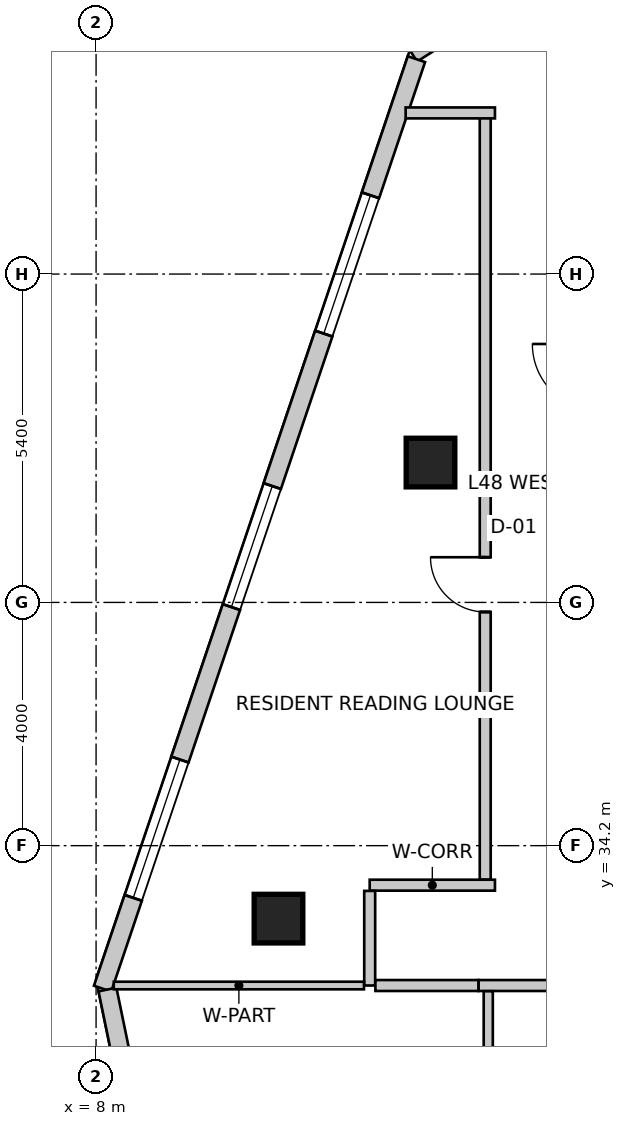
"""IFC4 building model, lengths in metres.
Left out: names, types, materials, properties, quantities, classifications, styles, units other than length and angle.
Written with IfcOpenShell. Run it as: python <this file> out.ifc"""

import sys

from ifc_helpers import new_model, si_unit, direction, frame, frame_2d, origin, origin_2d, place, context, subcontext, project, spatial, rectangle, extrude, source, transform, mapped, element, fill, save


model = new_model("IFC4")
c1 = context("Model", 3, precision=1e-05, world=origin(), true_north=direction((0.0, 1.0)))
c2 = subcontext(c1, "Body", "Model", "MODEL_VIEW")
j1 = project(units=[si_unit("LENGTHUNIT", "METRE"), si_unit("PLANEANGLEUNIT", "RADIAN")], contexts=[c1])
p1 = place(None, origin())
s1 = spatial("IfcSite", under=j1, at=p1, CompositionType="ELEMENT")
p2 = place(p1, origin())
s2 = spatial("IfcBuilding", under=s1, at=p2, CompositionType="ELEMENT")
p3 = place(p2, frame((0.0, 0.0, 193.9)))
s3 = spatial("IfcBuildingStorey", under=s2, at=p3, CompositionType="ELEMENT", Elevation=193.9)
m1 = source(origin(), c2, "Body", "SweptSolid", [
    extrude(rectangle(XDim=0.8, YDim=0.8, at=origin_2d()), origin(), (0.0, 0.0, 1.0), 3.5),
])
for number, where, z_axis, x_axis in (
    (1, (11.0, 33.0, 0.0), (0.0, 0.0, 1.0), (1.0, 0.0, 0.0)),
    (2, (13.5, 40.5, 0.0), (0.0, 0.0, 1.0), (1.0, 0.0, 0.0)),
):
    element("IfcColumn", number, at=place(p3, frame(where, z_axis=z_axis, x_axis=x_axis)), inside=s3, PredefinedType="COLUMN", context=c2, shape_type="MappedRepresentation", body=[
        mapped(m1, transform((0.0, 0.0, 0.0), scale=1.0)),
    ])
p4 = place(p3, frame((21.875, 52.742, 0.0), z_axis=(0.0, 0.0, 1.0), x_axis=(-0.843666375448, -0.536867811419, 0.0)))
e3 = element("IfcWall", 3, at=p4, inside=s3, PredefinedType="SOLIDWALL", context=c2, shape_type="SweptSolid", body=[
    extrude(rectangle(XDim=10.284, YDim=0.3, at=frame_2d((5.142, 0.0))), origin(), (0.0, 0.0, 1.0), 3.25),
])
m2 = source(origin(), c2, "Body", "SweptSolid", [
    extrude(rectangle(XDim=2.1, YDim=2.0, at=frame_2d((1.05, 1.0))), frame((0.0, 0.16, 0.0), z_axis=(0.0, -1.0, 0.0), x_axis=(1.0, 0.0, 0.0)), (0.0, 0.0, 1.0), 0.32),
])
p5 = place(p4, frame((3.457, 0.0, 0.85)))
e4 = element("IfcOpeningElement", 4, at=p5, cuts=e3, PredefinedType="OPENING", context=c2, shape_type="MappedRepresentation", body=[
    mapped(m2, transform((0.0, 0.0, 0.0), scale=1.0)),
])
p6 = place(p3, frame((13.269, 47.134, 0.0), z_axis=(0.0, 0.0, 1.0), x_axis=(-0.319920776449, -0.947444297464, 0.0)))
e5 = element("IfcWall", 5, at=p6, inside=s3, PredefinedType="SOLIDWALL", context=c2, shape_type="SweptSolid", body=[
    extrude(rectangle(XDim=16.133, YDim=0.3, at=frame_2d((8.067, 0.0))), origin(), (0.0, 0.0, 1.0), 3.25),
])
m3 = source(origin(), c2, "Body", "SweptSolid", [
    extrude(rectangle(XDim=2.4, YDim=2.2, at=frame_2d((1.2, 1.1))), frame((0.0, 0.16, 0.0), z_axis=(0.0, -1.0, 0.0), x_axis=(1.0, 0.0, 0.0)), (0.0, 0.0, 1.0), 0.32),
])
p7 = place(p6, frame((2.363, 0.0, 0.85)))
e6 = element("IfcOpeningElement", 6, at=p7, cuts=e5, PredefinedType="OPENING", context=c2, shape_type="MappedRepresentation", body=[
    mapped(m3, transform((0.0, 0.0, 0.0), scale=1.0)),
])
p8 = place(p6, frame((7.41, 0.0, 0.85)))
e7 = element("IfcOpeningElement", 7, at=p8, cuts=e5, PredefinedType="OPENING", context=c2, shape_type="MappedRepresentation", body=[
    mapped(m2, transform((0.0, 0.0, 0.0), scale=1.0)),
])
p9 = place(p6, frame((12.157, 0.0, 0.85)))
e8 = element("IfcOpeningElement", 8, at=p9, cuts=e5, PredefinedType="OPENING", context=c2, shape_type="MappedRepresentation", body=[
    mapped(m3, transform((0.0, 0.0, 0.0), scale=1.0)),
])
p10 = place(p3, frame((8.188, 31.834, 0.0), z_axis=(0.0, 0.0, 1.0), x_axis=(0.202303475707, -0.979322880217, 0.0)))
e9 = element("IfcWall", 9, at=p10, inside=s3, PredefinedType="SOLIDWALL", context=c2, shape_type="SweptSolid", body=[
    extrude(rectangle(XDim=15.766, YDim=0.3, at=frame_2d((7.883, 0.0))), origin(), (0.0, 0.0, 1.0), 3.25),
])
p11 = place(p10, frame((2.399, 0.0, 0.85)))
e10 = element("IfcOpeningElement", 10, at=p11, cuts=e9, PredefinedType="OPENING", context=c2, shape_type="MappedRepresentation", body=[
    mapped(m2, transform((0.0, 0.0, 0.0), scale=1.0)),
])
p12 = place(p10, frame((8.798, 0.0, 0.85)))
e11 = element("IfcOpeningElement", 11, at=p12, cuts=e9, PredefinedType="OPENING", context=c2, shape_type="MappedRepresentation", body=[
    mapped(m2, transform((0.0, 0.0, 0.0), scale=1.0)),
])
m4 = source(origin(), c2, "Body", "SweptSolid", [
    extrude(rectangle(XDim=1.2, YDim=1.6, at=frame_2d((0.6, 0.8))), frame((0.0, 0.16, 0.0), z_axis=(0.0, -1.0, 0.0), x_axis=(1.0, 0.0, 0.0)), (0.0, 0.0, 1.0), 0.32),
])
p13 = place(p10, frame((14.052, 0.0, 0.85)))
e12 = element("IfcOpeningElement", 12, at=p13, cuts=e9, PredefinedType="OPENING", context=c2, shape_type="MappedRepresentation", body=[
    mapped(m4, transform((0.0, 0.0, 0.0), scale=1.0)),
])
p14 = place(p3, frame((12.5, 33.55, 0.0), z_axis=(0.0, 0.0, 1.0), x_axis=(1.0, 0.0, 0.0)))
e13 = element("IfcWall", 13, at=p14, inside=s3, PredefinedType="PARTITIONING", context=c2, shape_type="SweptSolid", body=[
    extrude(rectangle(XDim=2.06, YDim=0.18, at=frame_2d((1.03, 0.0))), origin(), (0.0, 0.0, 1.0), 3.25),
])
p15 = place(p3, frame((12.5, 31.9, 0.0), z_axis=(0.0, 0.0, 1.0), x_axis=(0.0, 1.0, 0.0)))
e14 = element("IfcWall", 14, at=p15, inside=s3, PredefinedType="PARTITIONING", context=c2, shape_type="SweptSolid", body=[
    extrude(rectangle(XDim=1.556, YDim=0.18, at=frame_2d((0.778, 0.0))), origin(), (0.0, 0.0, 1.0), 2.835),
])
p16 = place(p3, frame((17.36, 31.9, 0.0), z_axis=(0.0, 0.0, 1.0), x_axis=(-1.0, 0.0, 0.0)))
e15 = element("IfcWall", 15, at=p16, inside=s3, PredefinedType="PARTITIONING", context=c2, shape_type="SweptSolid", body=[
    extrude(rectangle(XDim=3.07, YDim=0.18, at=frame_2d((1.535, 0.0))), origin(), (0.0, 0.0, 1.0), 2.835),
])
p17 = place(p3, frame((14.288, 31.9, 0.0), z_axis=(0.0, 0.0, 1.0), x_axis=(-1.0, 0.0, 0.0)))
e16 = element("IfcWall", 16, at=p17, inside=s3, PredefinedType="PARTITIONING", context=c2, shape_type="SweptSolid", body=[
    extrude(rectangle(XDim=1.694, YDim=0.18, at=frame_2d((0.847, 0.0))), origin(), (0.0, 0.0, 1.0), 2.835),
])
p18 = place(p3, frame((14.4, 33.644, 0.0), z_axis=(0.0, 0.0, 1.0), x_axis=(0.0, 1.0, 0.0)))
e17 = element("IfcWall", 17, at=p18, inside=s3, PredefinedType="PARTITIONING", context=c2, shape_type="SweptSolid", body=[
    extrude(rectangle(XDim=12.606, YDim=0.18, at=frame_2d((6.303, 0.0))), origin(), (0.0, 0.0, 1.0), 3.25),
])
m5 = source(origin(), c2, "Body", "SweptSolid", [
    extrude(rectangle(XDim=0.9, YDim=2.15, at=frame_2d((0.45, 1.075))), frame((0.0, 0.1, 0.0), z_axis=(0.0, -1.0, 0.0), x_axis=(1.0, 0.0, 0.0)), (0.0, 0.0, 1.0), 0.2),
])
p19 = place(p18, frame((4.399, 0.0, 0.0)))
e18 = element("IfcOpeningElement", 18, at=p19, cuts=e17, PredefinedType="OPENING", context=c2, shape_type="MappedRepresentation", body=[
    mapped(m5, transform((0.0, 0.0, 0.0), scale=1.0)),
])
p20 = place(p3, frame((14.56, 46.25, 0.0), z_axis=(0.0, 0.0, 1.0), x_axis=(-1.0, 0.0, 0.0)))
e19 = element("IfcWall", 19, at=p20, inside=s3, PredefinedType="PARTITIONING", context=c2, shape_type="SweptSolid", body=[
    extrude(rectangle(XDim=1.469, YDim=0.18, at=frame_2d((0.734, 0.0))), origin(), (0.0, 0.0, 1.0), 3.25),
])
p21 = place(p3, frame((12.406, 31.9, 0.0), z_axis=(0.0, 0.0, 1.0), x_axis=(-1.0, 0.0, 0.0)))
e20 = element("IfcWall", 20, at=p21, inside=s3, PredefinedType="PARTITIONING", context=c2, shape_type="SweptSolid", body=[
    extrude(rectangle(XDim=4.115, YDim=0.125, at=frame_2d((2.057, 0.0))), origin(), (0.0, 0.0, 1.0), 2.542),
])
p22 = place(p3, frame((14.45, 25.279, 0.0), z_axis=(0.0, 0.0, 1.0), x_axis=(0.0, 1.0, 0.0)))
e21 = element("IfcWall", 21, at=p22, inside=s3, PredefinedType="PARTITIONING", context=c2, shape_type="SweptSolid", body=[
    extrude(rectangle(XDim=6.527, YDim=0.15, at=frame_2d((3.263, 0.0))), origin(), (0.0, 0.0, 1.0), 2.688),
])
m6 = source(origin(), c2, "Body", "SweptSolid", [
    extrude(rectangle(XDim=2.4, YDim=2.2, at=frame_2d((1.2, 1.1))), frame((0.0, -0.015, 0.0), z_axis=(0.0, -1.0, 0.0), x_axis=(1.0, 0.0, 0.0)), (0.0, 0.0, 1.0), 0.06),
])
p23 = place(p7, origin())
e22 = element("IfcWindow", 22, at=p23, inside=s3, PartitioningType="SINGLE_PANEL", PredefinedType="WINDOW", context=c2, shape_type="MappedRepresentation", body=[
    mapped(m6, transform((0.0, 0.0, 0.0), scale=1.0)),
])
fill(e6, e22)
m7 = source(origin(), c2, "Body", "SweptSolid", [
    extrude(rectangle(XDim=2.1, YDim=2.0, at=frame_2d((1.05, 1.0))), frame((0.0, -0.015, 0.0), z_axis=(0.0, -1.0, 0.0), x_axis=(1.0, 0.0, 0.0)), (0.0, 0.0, 1.0), 0.06),
])
p24 = place(p8, origin())
e23 = element("IfcWindow", 23, at=p24, inside=s3, PartitioningType="SINGLE_PANEL", PredefinedType="WINDOW", context=c2, shape_type="MappedRepresentation", body=[
    mapped(m7, transform((0.0, 0.0, 0.0), scale=1.0)),
])
fill(e7, e23)
p25 = place(p9, origin())
e24 = element("IfcWindow", 24, at=p25, inside=s3, PartitioningType="SINGLE_PANEL", PredefinedType="WINDOW", context=c2, shape_type="MappedRepresentation", body=[
    mapped(m6, transform((0.0, 0.0, 0.0), scale=1.0)),
])
fill(e8, e24)
m8 = source(origin(), c2, "Body", "SweptSolid", [
    extrude(rectangle(XDim=0.9, YDim=2.15, at=frame_2d((0.45, 1.075))), frame((0.0, 0.025, 0.0), z_axis=(0.0, -1.0, 0.0), x_axis=(1.0, 0.0, 0.0)), (0.0, 0.0, 1.0), 0.05),
])
p26 = place(p19, origin())
e25 = element("IfcDoor", 25, at=p26, inside=s3, OperationType="SINGLE_SWING_RIGHT", PredefinedType="DOOR", context=c2, shape_type="MappedRepresentation", body=[
    mapped(m8, transform((0.0, 0.0, 0.0), scale=1.0)),
])
fill(e18, e25)
save(model, sys.argv[1])
